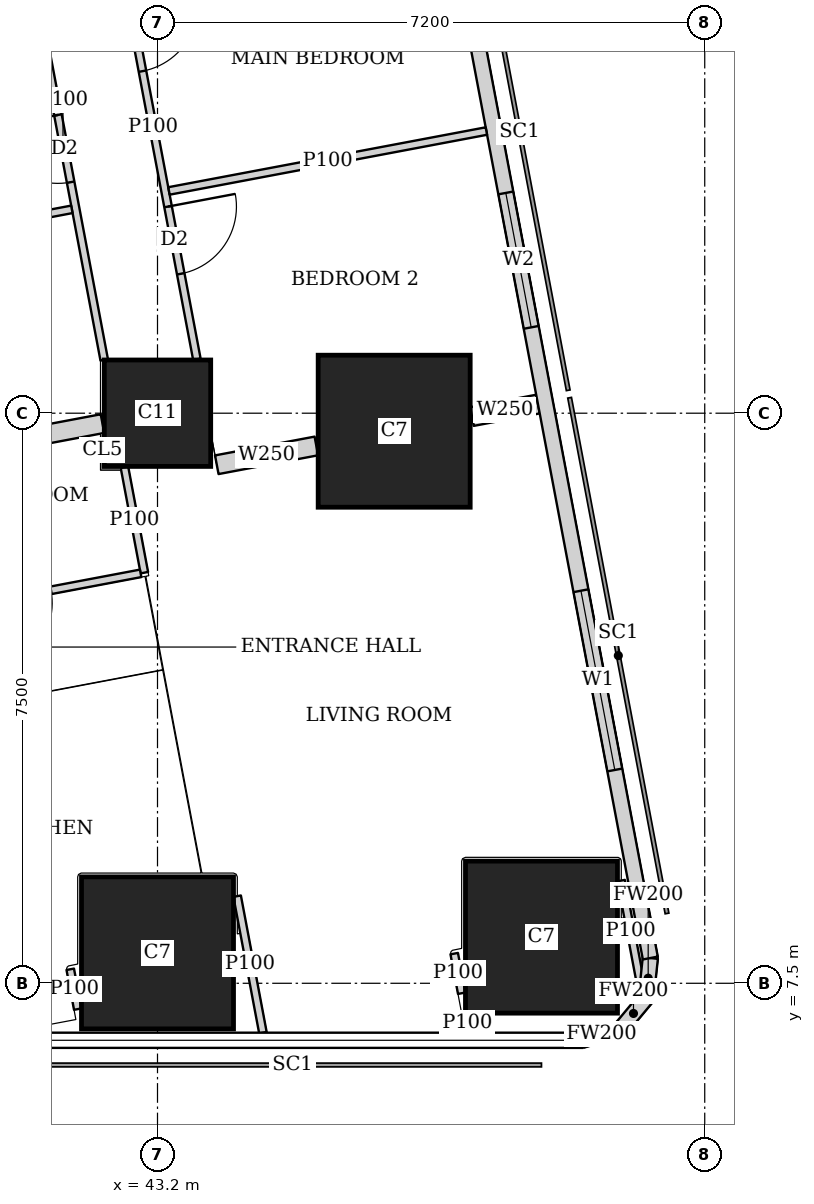
"""IFC4 building model, lengths in metres.
Left out: names, types, materials, properties, quantities, classifications, styles, units other than length and angle.
Written with IfcOpenShell. Run it as: python <this file> out.ifc"""

import sys

from ifc_helpers import new_model, si_unit, direction, frame, frame_2d, origin, origin_2d, place, context, subcontext, project, spatial, rectangle, extrude, element, fill, save


model = new_model("IFC4")
c1 = context("Model", 3, precision=1e-05, world=origin(), true_north=direction((0.0, 1.0)))
c2 = subcontext(c1, "Body", "Model", "MODEL_VIEW")
j1 = project(units=[si_unit("LENGTHUNIT", "METRE"), si_unit("PLANEANGLEUNIT", "RADIAN")], contexts=[c1])
p1 = place(None, origin())
s1 = spatial("IfcSite", under=j1, at=p1, CompositionType="ELEMENT")
p2 = place(p1, origin())
s2 = spatial("IfcBuilding", under=s1, at=p2, CompositionType="ELEMENT")
p3 = place(p2, frame((0.0, 0.0, 262.85)))
s3 = spatial("IfcBuildingStorey", under=s2, at=p3, CompositionType="ELEMENT", Elevation=262.85)
for number, where, z_axis, x_axis in (
    (1, (43.2, 7.9, 0.0), (0.0, 0.0, 1.0), (1.0, 0.0, 0.0)),
    (2, (48.252, 8.107, 0.0), (0.0, 0.0, 1.0), (1.0, 0.0, 0.0)),
):
    element("IfcColumn", number, at=place(p3, frame(where, z_axis=z_axis, x_axis=x_axis)), inside=s3, PredefinedType="COLUMN", context=c2, shape_type="SweptSolid", body=[
        extrude(rectangle(XDim=2.0, YDim=2.0, at=origin_2d()), origin(), (0.0, 0.0, 1.0), 3.75),
    ])
p4 = place(p3, frame((43.2, 15.0, 0.0), z_axis=(0.0, 0.0, 1.0), x_axis=(1.0, 0.0, 0.0)))
e3 = element("IfcColumn", 3, at=p4, inside=s3, PredefinedType="COLUMN", context=c2, shape_type="SweptSolid", body=[
    extrude(rectangle(XDim=1.4, YDim=1.4, at=origin_2d()), origin(), (0.0, 0.0, 1.0), 3.75),
])
p5 = place(p3, frame((46.314, 14.763, 0.0), z_axis=(0.0, 0.0, 1.0), x_axis=(1.0, 0.0, 0.0)))
e4 = element("IfcColumn", 4, at=p5, inside=s3, PredefinedType="COLUMN", context=c2, shape_type="SweptSolid", body=[
    extrude(rectangle(XDim=2.0, YDim=2.0, at=origin_2d()), origin(), (0.0, 0.0, 1.0), 3.75),
])
p6 = place(p3, frame((48.787, 6.75, 0.0), z_axis=(0.0, 0.0, 1.0), x_axis=(0.957282247819, 0.289155145225, 0.0)))
e5 = element("IfcWall", 5, at=p6, inside=s3, PredefinedType="SOLIDWALL", context=c2, shape_type="SweptSolid", body=[
    extrude(rectangle(XDim=0.533, YDim=0.2, at=frame_2d((0.266, 0.0))), origin(), (0.0, 0.0, 1.0), 3.5),
])
p7 = place(p3, frame((49.297, 6.904, 0.0), z_axis=(0.0, 0.0, 1.0), x_axis=(0.639255849474, 0.768994121508, 0.0)))
e6 = element("IfcWall", 6, at=p7, inside=s3, PredefinedType="SOLIDWALL", context=c2, shape_type="SweptSolid", body=[
    extrude(rectangle(XDim=0.518, YDim=0.2, at=frame_2d((0.259, 0.0))), origin(), (0.0, 0.0, 1.0), 3.5),
])
p8 = place(p3, frame((49.628, 7.302, 0.0), z_axis=(0.0, 0.0, 1.0), x_axis=(0.105352390132, 0.994434952068, 0.0)))
e7 = element("IfcWall", 7, at=p8, inside=s3, PredefinedType="SOLIDWALL", context=c2, shape_type="SweptSolid", body=[
    extrude(rectangle(XDim=0.533, YDim=0.2, at=frame_2d((0.267, 0.0))), origin(), (0.0, 0.0, 1.0), 3.5),
])
p9 = place(p3, frame((49.684, 7.832, 0.0), z_axis=(0.0, 0.0, 1.0), x_axis=(-0.185616669694, 0.982622232565, 0.0)))
e8 = element("IfcWall", 8, at=p9, inside=s3, PredefinedType="SOLIDWALL", context=c2, shape_type="SweptSolid", body=[
    extrude(rectangle(XDim=36.0, YDim=0.2, at=frame_2d((18.0, 0.0))), origin(), (0.0, 0.0, 1.0), 3.5),
])
p10 = place(p9, frame((2.518, 0.0, 0.9)))
e9 = element("IfcOpeningElement", 9, at=p10, cuts=e8, PredefinedType="OPENING", context=c2, shape_type="SweptSolid", body=[
    extrude(rectangle(XDim=2.4, YDim=1.5, at=frame_2d((1.2, 0.75))), frame((0.0, 0.11, 0.0), z_axis=(0.0, -1.0, 0.0), x_axis=(1.0, 0.0, 0.0)), (0.0, 0.0, 1.0), 0.22),
])
p11 = place(p9, frame((8.444, 0.0, 0.9)))
e10 = element("IfcOpeningElement", 10, at=p11, cuts=e8, PredefinedType="OPENING", context=c2, shape_type="SweptSolid", body=[
    extrude(rectangle(XDim=1.8, YDim=1.5, at=frame_2d((0.9, 0.75))), frame((0.0, 0.11, 0.0), z_axis=(0.0, -1.0, 0.0), x_axis=(1.0, 0.0, 0.0)), (0.0, 0.0, 1.0), 0.22),
])
p12 = place(p9, frame((12.261, 0.0, 0.9)))
e11 = element("IfcOpeningElement", 11, at=p12, cuts=e8, PredefinedType="OPENING", context=c2, shape_type="SweptSolid", body=[
    extrude(rectangle(XDim=1.8, YDim=1.5, at=frame_2d((0.9, 0.75))), frame((0.0, 0.11, 0.0), z_axis=(0.0, -1.0, 0.0), x_axis=(1.0, 0.0, 0.0)), (0.0, 0.0, 1.0), 0.22),
])
p13 = place(p9, frame((16.078, 0.0, 0.9)))
e12 = element("IfcOpeningElement", 12, at=p13, cuts=e8, PredefinedType="OPENING", context=c2, shape_type="SweptSolid", body=[
    extrude(rectangle(XDim=1.8, YDim=1.5, at=frame_2d((0.9, 0.75))), frame((0.0, 0.11, 0.0), z_axis=(0.0, -1.0, 0.0), x_axis=(1.0, 0.0, 0.0)), (0.0, 0.0, 1.0), 0.22),
])
p14 = place(p9, frame((19.894, 0.0, 0.9)))
e13 = element("IfcOpeningElement", 13, at=p14, cuts=e8, PredefinedType="OPENING", context=c2, shape_type="SweptSolid", body=[
    extrude(rectangle(XDim=1.8, YDim=1.5, at=frame_2d((0.9, 0.75))), frame((0.0, 0.11, 0.0), z_axis=(0.0, -1.0, 0.0), x_axis=(1.0, 0.0, 0.0)), (0.0, 0.0, 1.0), 0.22),
])
p15 = place(p9, frame((23.71, 0.0, 0.9)))
e14 = element("IfcOpeningElement", 14, at=p15, cuts=e8, PredefinedType="OPENING", context=c2, shape_type="SweptSolid", body=[
    extrude(rectangle(XDim=1.8, YDim=1.5, at=frame_2d((0.9, 0.75))), frame((0.0, 0.11, 0.0), z_axis=(0.0, -1.0, 0.0), x_axis=(1.0, 0.0, 0.0)), (0.0, 0.0, 1.0), 0.22),
])
p16 = place(p9, frame((27.526, 0.0, 0.9)))
e15 = element("IfcOpeningElement", 15, at=p16, cuts=e8, PredefinedType="OPENING", context=c2, shape_type="SweptSolid", body=[
    extrude(rectangle(XDim=1.8, YDim=1.5, at=frame_2d((0.9, 0.75))), frame((0.0, 0.11, 0.0), z_axis=(0.0, -1.0, 0.0), x_axis=(1.0, 0.0, 0.0)), (0.0, 0.0, 1.0), 0.22),
])
p17 = place(p9, frame((32.046, 0.0, 0.9)))
e16 = element("IfcOpeningElement", 16, at=p17, cuts=e8, PredefinedType="OPENING", context=c2, shape_type="SweptSolid", body=[
    extrude(rectangle(XDim=1.8, YDim=1.5, at=frame_2d((0.9, 0.75))), frame((0.0, 0.11, 0.0), z_axis=(0.0, -1.0, 0.0), x_axis=(1.0, 0.0, 0.0)), (0.0, 0.0, 1.0), 0.22),
])
p18 = place(p3, frame((44.248, 8.646, 0.0), z_axis=(0.0, 0.0, 1.0), x_axis=(0.185417594585, -0.982659816833, 0.0)))
e17 = element("IfcWall", 17, at=p18, inside=s3, PredefinedType="PARTITIONING", context=c2, shape_type="SweptSolid", body=[
    extrude(rectangle(XDim=1.828, YDim=0.1, at=frame_2d((0.914, 0.0))), origin(), (0.0, 0.0, 1.0), 2.05),
])
p19 = place(p3, frame((42.151, 7.16, 0.0), z_axis=(0.0, 0.0, 1.0), x_axis=(-0.185366164644, 0.982669519729, 0.0)))
e18 = element("IfcWall", 18, at=p19, inside=s3, PredefinedType="PARTITIONING", context=c2, shape_type="SweptSolid", body=[
    extrude(rectangle(XDim=0.533, YDim=0.1, at=frame_2d((0.267, 0.0))), origin(), (0.0, 0.0, 1.0), 2.5),
])
p20 = place(p3, frame((49.3, 8.851, 0.0), z_axis=(0.0, 0.0, 1.0), x_axis=(0.18581620423, -0.982584519645, 0.0)))
e19 = element("IfcWall", 19, at=p20, inside=s3, PredefinedType="PARTITIONING", context=c2, shape_type="SweptSolid", body=[
    extrude(rectangle(XDim=1.351, YDim=0.1, at=frame_2d((0.675, 0.0))), origin(), (0.0, 0.0, 1.0), 3.5),
])
p21 = place(p3, frame((47.301, 6.85, 0.0), z_axis=(0.0, 0.0, 1.0), x_axis=(-0.187513903188, 0.982261948826, 0.0)))
e20 = element("IfcWall", 20, at=p21, inside=s3, PredefinedType="PARTITIONING", context=c2, shape_type="SweptSolid", body=[
    extrude(rectangle(XDim=0.251, YDim=0.1, at=frame_2d((0.125, 0.0))), origin(), (0.0, 0.0, 1.0), 3.5),
])
p22 = place(p3, frame((47.203, 7.369, 0.0), z_axis=(0.0, 0.0, 1.0), x_axis=(-0.186456243114, 0.982463266185, 0.0)))
e21 = element("IfcWall", 21, at=p22, inside=s3, PredefinedType="PARTITIONING", context=c2, shape_type="SweptSolid", body=[
    extrude(rectangle(XDim=0.53, YDim=0.1, at=frame_2d((0.265, 0.0))), origin(), (0.0, 0.0, 1.0), 2.05),
])
p23 = place(p3, frame((42.566, 21.809, 0.0), z_axis=(0.0, 0.0, 1.0), x_axis=(0.185613526435, -0.98262282632, 0.0)))
e22 = element("IfcWall", 22, at=p23, inside=s3, PredefinedType="PARTITIONING", context=c2, shape_type="SweptSolid", body=[
    extrude(rectangle(XDim=6.207, YDim=0.1, at=frame_2d((3.104, 0.0))), origin(), (0.0, 0.0, 1.0), 2.5),
])
p24 = place(p23, frame((1.45, 0.0, 0.0)))
e23 = element("IfcOpeningElement", 23, at=p24, cuts=e22, PredefinedType="OPENING", context=c2, shape_type="SweptSolid", body=[
    extrude(rectangle(XDim=0.9, YDim=2.1, at=frame_2d((0.45, 1.05))), frame((0.0, 0.06, 0.0), z_axis=(0.0, -1.0, 0.0), x_axis=(1.0, 0.0, 0.0)), (0.0, 0.0, 1.0), 0.12),
])
p25 = place(p23, frame((4.163, 0.0, 0.0)))
e24 = element("IfcOpeningElement", 24, at=p25, cuts=e22, PredefinedType="OPENING", context=c2, shape_type="SweptSolid", body=[
    extrude(rectangle(XDim=0.9, YDim=2.1, at=frame_2d((0.45, 1.05))), frame((0.0, 0.06, 0.0), z_axis=(0.0, -1.0, 0.0), x_axis=(1.0, 0.0, 0.0)), (0.0, 0.0, 1.0), 0.12),
])
p26 = place(p3, frame((41.414, 21.442, 0.0), z_axis=(0.0, 0.0, 1.0), x_axis=(0.185698675093, -0.982606738257, 0.0)))
e25 = element("IfcWall", 25, at=p26, inside=s3, PredefinedType="PARTITIONING", context=c2, shape_type="SweptSolid", body=[
    extrude(rectangle(XDim=5.843, YDim=0.1, at=frame_2d((2.921, 0.0))), origin(), (0.0, 0.0, 1.0), 3.5),
])
p27 = place(p26, frame((0.655, 0.0, 0.0)))
e26 = element("IfcOpeningElement", 26, at=p27, cuts=e25, PredefinedType="OPENING", context=c2, shape_type="SweptSolid", body=[
    extrude(rectangle(XDim=0.9, YDim=2.1, at=frame_2d((0.45, 1.05))), frame((0.0, 0.06, 0.0), z_axis=(0.0, -1.0, 0.0), x_axis=(1.0, 0.0, 0.0)), (0.0, 0.0, 1.0), 0.12),
])
p28 = place(p26, frame((2.563, 0.0, 0.0)))
e27 = element("IfcOpeningElement", 27, at=p28, cuts=e25, PredefinedType="OPENING", context=c2, shape_type="SweptSolid", body=[
    extrude(rectangle(XDim=0.9, YDim=2.1, at=frame_2d((0.45, 1.05))), frame((0.0, 0.06, 0.0), z_axis=(0.0, -1.0, 0.0), x_axis=(1.0, 0.0, 0.0)), (0.0, 0.0, 1.0), 0.12),
])
p29 = place(p3, frame((47.527, 18.712, 0.0), z_axis=(0.0, 0.0, 1.0), x_axis=(-0.982665405803, -0.185387972203, 0.0)))
e28 = element("IfcWall", 28, at=p29, inside=s3, PredefinedType="PARTITIONING", context=c2, shape_type="SweptSolid", body=[
    extrude(rectangle(XDim=4.25, YDim=0.1, at=frame_2d((2.125, 0.0))), origin(), (0.0, 0.0, 1.0), 2.5),
])
p30 = place(p3, frame((42.073, 17.682, 0.0), z_axis=(0.0, 0.0, 1.0), x_axis=(-0.982620626894, -0.185625169636, 0.0)))
e29 = element("IfcWall", 29, at=p30, inside=s3, PredefinedType="PARTITIONING", context=c2, shape_type="SweptSolid", body=[
    extrude(rectangle(XDim=3.275, YDim=0.1, at=frame_2d((1.637, 0.0))), origin(), (0.0, 0.0, 1.0), 3.5),
])
p31 = place(p30, frame((1.2, 0.0, 0.0)))
e30 = element("IfcOpeningElement", 30, at=p31, cuts=e29, PredefinedType="OPENING", context=c2, shape_type="SweptSolid", body=[
    extrude(rectangle(XDim=0.9, YDim=2.1, at=frame_2d((0.45, 1.05))), frame((0.0, 0.06, 0.0), z_axis=(0.0, -1.0, 0.0), x_axis=(1.0, 0.0, 0.0)), (0.0, 0.0, 1.0), 0.12),
])
p32 = place(p3, frame((42.765, 14.29, 0.0), z_axis=(0.0, 0.0, 1.0), x_axis=(0.185634589628, -0.982618847333, 0.0)))
e31 = element("IfcWall", 31, at=p32, inside=s3, PredefinedType="PARTITIONING", context=c2, shape_type="SweptSolid", body=[
    extrude(rectangle(XDim=1.413, YDim=0.1, at=frame_2d((0.706, 0.0))), origin(), (0.0, 0.0, 1.0), 3.5),
])
p33 = place(p3, frame((42.978, 12.893, 0.0), z_axis=(0.0, 0.0, 1.0), x_axis=(-0.982607026909, -0.185697147715, 0.0)))
e32 = element("IfcWall", 32, at=p33, inside=s3, PredefinedType="PARTITIONING", context=c2, shape_type="SweptSolid", body=[
    extrude(rectangle(XDim=3.275, YDim=0.1, at=frame_2d((1.637, 0.0))), origin(), (0.0, 0.0, 1.0), 3.5),
])
p34 = place(p33, frame((1.2, 0.0, 0.0)))
e33 = element("IfcOpeningElement", 33, at=p34, cuts=e32, PredefinedType="OPENING", context=c2, shape_type="SweptSolid", body=[
    extrude(rectangle(XDim=0.9, YDim=2.1, at=frame_2d((0.45, 1.05))), frame((0.0, 0.06, 0.0), z_axis=(0.0, -1.0, 0.0), x_axis=(1.0, 0.0, 0.0)), (0.0, 0.0, 1.0), 0.12),
])
p35 = place(p3, frame((48.206, 15.12, 0.0), z_axis=(0.0, 0.0, 1.0), x_axis=(-0.982608419258, -0.185689780017, 0.0)))
e34 = element("IfcWall", 34, at=p35, inside=s3, PredefinedType="SOLIDWALL", context=c2, shape_type="SweptSolid", body=[
    extrude(rectangle(XDim=0.884, YDim=0.25, at=frame_2d((0.442, 0.0))), origin(), (0.0, 0.0, 1.0), 3.5),
])
p36 = place(p3, frame((45.29, 14.569, 0.0), z_axis=(0.0, 0.0, 1.0), x_axis=(-0.982676759201, -0.185327782391, 0.0)))
e35 = element("IfcWall", 35, at=p36, inside=s3, PredefinedType="SOLIDWALL", context=c2, shape_type="SweptSolid", body=[
    extrude(rectangle(XDim=1.333, YDim=0.25, at=frame_2d((0.667, 0.0))), origin(), (0.0, 0.0, 1.0), 3.5),
])
p37 = place(p3, frame((42.476, 14.863, 0.0), z_axis=(0.0, 0.0, 1.0), x_axis=(-0.982638716117, -0.185529387398, 0.0)))
e36 = element("IfcWall", 36, at=p37, inside=s3, PredefinedType="SOLIDWALL", context=c2, shape_type="SweptSolid", body=[
    extrude(rectangle(XDim=3.148, YDim=0.25, at=frame_2d((1.574, 0.0))), origin(), (0.0, 0.0, 1.0), 3.5),
])
p38 = place(p10, origin())
e37 = element("IfcWindow", 37, at=p38, inside=s3, PartitioningType="SINGLE_PANEL", PredefinedType="WINDOW", context=c2, shape_type="SweptSolid", body=[
    extrude(rectangle(XDim=2.4, YDim=1.5, at=frame_2d((1.2, 0.75))), frame((0.0, 0.03, 0.0), z_axis=(0.0, -1.0, 0.0), x_axis=(1.0, 0.0, 0.0)), (0.0, 0.0, 1.0), 0.06),
])
fill(e9, e37)
p39 = place(p11, origin())
e38 = element("IfcWindow", 38, at=p39, inside=s3, PartitioningType="SINGLE_PANEL", PredefinedType="WINDOW", context=c2, shape_type="SweptSolid", body=[
    extrude(rectangle(XDim=1.8, YDim=1.5, at=frame_2d((0.9, 0.75))), frame((0.0, 0.03, 0.0), z_axis=(0.0, -1.0, 0.0), x_axis=(1.0, 0.0, 0.0)), (0.0, 0.0, 1.0), 0.06),
])
fill(e10, e38)
p40 = place(p24, origin())
e39 = element("IfcDoor", 39, at=p40, inside=s3, OperationType="SINGLE_SWING_LEFT", PredefinedType="DOOR", context=c2, shape_type="SweptSolid", body=[
    extrude(rectangle(XDim=0.9, YDim=2.1, at=frame_2d((0.45, 1.05))), frame((0.0, 0.025, 0.0), z_axis=(0.0, -1.0, 0.0), x_axis=(1.0, 0.0, 0.0)), (0.0, 0.0, 1.0), 0.05),
])
fill(e23, e39)
p41 = place(p25, origin())
e40 = element("IfcDoor", 40, at=p41, inside=s3, OperationType="SINGLE_SWING_LEFT", PredefinedType="DOOR", context=c2, shape_type="SweptSolid", body=[
    extrude(rectangle(XDim=0.9, YDim=2.1, at=frame_2d((0.45, 1.05))), frame((0.0, 0.025, 0.0), z_axis=(0.0, -1.0, 0.0), x_axis=(1.0, 0.0, 0.0)), (0.0, 0.0, 1.0), 0.05),
])
fill(e24, e40)
p42 = place(p28, origin())
e41 = element("IfcDoor", 41, at=p42, inside=s3, OperationType="SINGLE_SWING_RIGHT", PredefinedType="DOOR", context=c2, shape_type="SweptSolid", body=[
    extrude(rectangle(XDim=0.9, YDim=2.1, at=frame_2d((0.45, 1.05))), frame((0.0, 0.025, 0.0), z_axis=(0.0, -1.0, 0.0), x_axis=(1.0, 0.0, 0.0)), (0.0, 0.0, 1.0), 0.05),
])
fill(e27, e41)
save(model, sys.argv[1])
